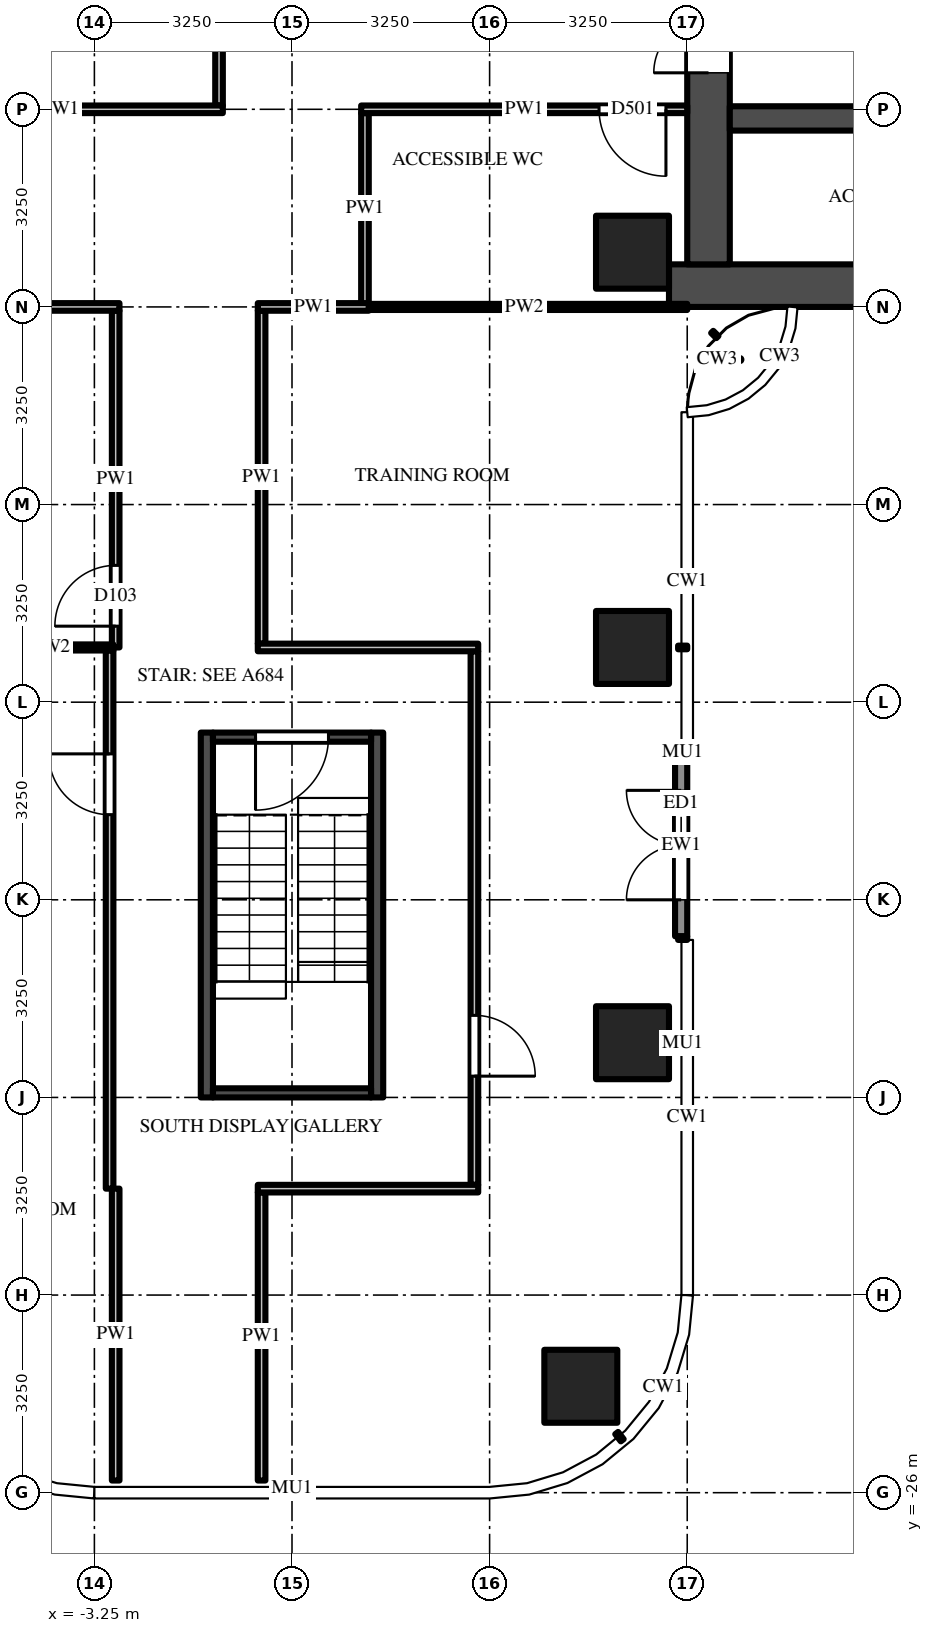
"""IFC4 building model, lengths in metres.
Left out: names, types, materials, properties, quantities, classifications, styles, units other than length and angle.
Written with IfcOpenShell. Run it as: python <this file> out.ifc"""

import sys

from ifc_helpers import new_model, si_unit, direction, frame, frame_2d, origin, origin_2d, place, context, subcontext, project, spatial, rectangle, extrude, source, transform, mapped, element, fill, save


model = new_model("IFC4")
c1 = context("Model", 3, precision=1e-05, world=origin(), true_north=direction((0.0, 1.0)))
c2 = subcontext(c1, "Body", "Model", "MODEL_VIEW")
j1 = project(units=[si_unit("LENGTHUNIT", "METRE"), si_unit("PLANEANGLEUNIT", "RADIAN")], contexts=[c1])
p1 = place(None, origin())
s1 = spatial("IfcSite", under=j1, at=p1, CompositionType="ELEMENT")
p2 = place(p1, origin())
s2 = spatial("IfcBuilding", under=s1, at=p2, CompositionType="ELEMENT")
p3 = place(p2, frame((0.0, 0.0, 165.9)))
s3 = spatial("IfcBuildingStorey", under=s2, at=p3, CompositionType="ELEMENT", Elevation=165.9)
m1 = source(origin(), c2, "Body", "SweptSolid", [
    extrude(rectangle(XDim=1.2, YDim=1.2, at=origin_2d()), origin(), (0.0, 0.0, 1.0), 3.9),
])
for number, where, z_axis, x_axis in (
    (1, (5.6, -5.6, 0.0), (0.0, 0.0, 1.0), (1.0, 0.0, 0.0)),
    (2, (5.6, -12.1, 0.0), (0.0, 0.0, 1.0), (1.0, 0.0, 0.0)),
    (3, (5.6, -18.6, 0.0), (0.0, 0.0, 1.0), (1.0, 0.0, 0.0)),
    (4, (4.75, -24.25, 0.0), (0.0, 0.0, 1.0), (1.0, 0.0, 0.0)),
):
    element("IfcColumn", number, at=place(p3, frame(where, z_axis=z_axis, x_axis=x_axis)), inside=s3, PredefinedType="COLUMN", context=c2, shape_type="MappedRepresentation", body=[
        mapped(m1, transform((0.0, 0.0, 0.0))),
    ])
m2 = source(origin(), c2, "Body", "SweptSolid", [
    extrude(rectangle(XDim=16.55, YDim=0.7, at=frame_2d((8.275, 0.0))), origin(), (0.0, 0.0, 1.0), 3.7),
])
p4 = place(p3, frame((6.2, -6.15, 0.0), z_axis=(0.0, 0.0, 1.0), x_axis=(1.0, 0.0, 0.0)))
e5 = element("IfcWall", 5, at=p4, inside=s3, PredefinedType="SHEAR", context=c2, shape_type="MappedRepresentation", body=[
    mapped(m2, transform((0.0, 0.0, 0.0))),
])
m3 = source(origin(), c2, "Body", "SweptSolid", [
    extrude(rectangle(XDim=9.05, YDim=0.7, at=frame_2d((4.525, 0.0))), origin(), (0.0, 0.0, 1.0), 3.7),
])
p5 = place(p3, frame((6.85, -5.8, 0.0), z_axis=(0.0, 0.0, 1.0), x_axis=(0.0, 1.0, 0.0)))
e6 = element("IfcWall", 6, at=p5, inside=s3, PredefinedType="SHEAR", context=c2, shape_type="MappedRepresentation", body=[
    mapped(m3, transform((0.0, 0.0, 0.0))),
])
m4 = source(origin(), c2, "Body", "SweptSolid", [
    extrude(rectangle(XDim=1.8, YDim=2.1, at=frame_2d((0.9, 1.05))), frame((0.0, 0.36, 0.0), z_axis=(0.0, -1.0, 0.0), x_axis=(1.0, 0.0, 0.0)), (0.0, 0.0, 1.0), 0.72),
])
p6 = place(p5, frame((3.15, 0.0, 0.0)))
e7 = element("IfcOpeningElement", 7, at=p6, cuts=e6, PredefinedType="OPENING", context=c2, shape_type="MappedRepresentation", body=[
    mapped(m4, transform((0.0, 0.0, 0.0))),
])
m5 = source(origin(), c2, "Body", "SweptSolid", [
    extrude(rectangle(XDim=7.5, YDim=0.4, at=frame_2d((3.75, 0.0))), origin(), (0.0, 0.0, 1.0), 3.7),
])
p7 = place(p3, frame((7.2, -3.4, 0.0), z_axis=(0.0, 0.0, 1.0), x_axis=(1.0, 0.0, 0.0)))
e8 = element("IfcWall", 8, at=p7, inside=s3, PredefinedType="SHEAR", context=c2, shape_type="MappedRepresentation", body=[
    mapped(m5, transform((0.0, 0.0, 0.0))),
])
m6 = source(origin(), c2, "Body", "SweptSolid", [
    extrude(rectangle(XDim=1.0, YDim=2.1, at=frame_2d((0.5, 1.05))), frame((0.0, 0.21, 0.0), z_axis=(0.0, -1.0, 0.0), x_axis=(1.0, 0.0, 0.0)), (0.0, 0.0, 1.0), 0.42),
])
p8 = place(p7, frame((2.363, 0.0, 0.0)))
e9 = element("IfcOpeningElement", 9, at=p8, cuts=e8, PredefinedType="OPENING", context=c2, shape_type="MappedRepresentation", body=[
    mapped(m6, transform((0.0, 0.0, 0.0))),
])
m7 = source(origin(), c2, "Body", "SweptSolid", [
    extrude(rectangle(XDim=0.8, YDim=2.1, at=frame_2d((0.4, 1.05))), frame((0.0, 0.21, 0.0), z_axis=(0.0, -1.0, 0.0), x_axis=(1.0, 0.0, 0.0)), (0.0, 0.0, 1.0), 0.42),
])
p9 = place(p7, frame((6.087, 0.0, 0.0)))
e10 = element("IfcOpeningElement", 10, at=p9, cuts=e8, PredefinedType="OPENING", context=c2, shape_type="MappedRepresentation", body=[
    mapped(m7, transform((0.0, 0.0, 0.0))),
])
m8 = source(origin(), c2, "Body", "SweptSolid", [
    extrude(rectangle(XDim=6.0, YDim=0.2, at=frame_2d((3.0, 0.0))), origin(), (0.0, 0.0, 1.0), 3.7),
])
for number, where, z_axis, x_axis in (
    (11, (1.4, -13.5, 0.0), (0.0, 0.0, 1.0), (0.0, -1.0, 0.0)),
    (12, (-1.4, -13.5, 0.0), (0.0, 0.0, 1.0), (0.0, -1.0, 0.0)),
):
    element("IfcWall", number, at=place(p3, frame(where, z_axis=z_axis, x_axis=x_axis)), inside=s3, PredefinedType="SHEAR", context=c2, shape_type="MappedRepresentation", body=[
        mapped(m8, transform((0.0, 0.0, 0.0))),
    ])
m9 = source(origin(), c2, "Body", "SweptSolid", [
    extrude(rectangle(XDim=2.6, YDim=0.15, at=frame_2d((1.3, 0.0))), origin(), (0.0, 0.0, 1.0), 3.7),
])
p10 = place(p3, frame((1.3, -13.575, 0.0), z_axis=(0.0, 0.0, 1.0), x_axis=(-1.0, 0.0, 0.0)))
e13 = element("IfcWall", 13, at=p10, inside=s3, PredefinedType="SHEAR", context=c2, shape_type="MappedRepresentation", body=[
    mapped(m9, transform((0.0, 0.0, 0.0))),
])
m10 = source(origin(), c2, "Body", "SweptSolid", [
    extrude(rectangle(XDim=1.2, YDim=2.1, at=frame_2d((0.6, 1.05))), frame((0.0, 0.085, 0.0), z_axis=(0.0, -1.0, 0.0), x_axis=(1.0, 0.0, 0.0)), (0.0, 0.0, 1.0), 0.17),
])
p11 = place(p10, frame((0.7, 0.0, 0.0)))
e14 = element("IfcOpeningElement", 14, at=p11, cuts=e13, PredefinedType="OPENING", context=c2, shape_type="MappedRepresentation", body=[
    mapped(m10, transform((0.0, 0.0, 0.0))),
])
p12 = place(p3, frame((1.3, -19.425, 0.0), z_axis=(0.0, 0.0, 1.0), x_axis=(-1.0, 0.0, 0.0)))
e15 = element("IfcWall", 15, at=p12, inside=s3, PredefinedType="SHEAR", context=c2, shape_type="MappedRepresentation", body=[
    mapped(m9, transform((0.0, 0.0, 0.0))),
])
m11 = source(origin(), c2, "Body", "SweptSolid", [
    extrude(rectangle(XDim=3.0, YDim=0.2, at=frame_2d((1.5, 0.0))), origin(), (0.0, 0.0, 1.0), 3.7),
])
p13 = place(p3, frame((6.4, -16.85, 0.0), z_axis=(0.0, 0.0, 1.0), x_axis=(0.0, 1.0, 0.0)))
e16 = element("IfcWall", 16, at=p13, inside=s3, PredefinedType="SOLIDWALL", context=c2, shape_type="MappedRepresentation", body=[
    mapped(m11, transform((0.0, 0.0, 0.0))),
])
m12 = source(origin(), c2, "Body", "SweptSolid", [
    extrude(rectangle(XDim=1.8, YDim=2.4, at=frame_2d((0.9, 1.2))), frame((0.0, 0.11, 0.0), z_axis=(0.0, -1.0, 0.0), x_axis=(1.0, 0.0, 0.0)), (0.0, 0.0, 1.0), 0.22),
])
p14 = place(p13, frame((0.6, 0.0, 0.0)))
e17 = element("IfcOpeningElement", 17, at=p14, cuts=e16, PredefinedType="OPENING", context=c2, shape_type="MappedRepresentation", body=[
    mapped(m12, transform((0.0, 0.0, 0.0))),
])
m13 = source(origin(), c2, "Body", "SweptSolid", [
    extrude(rectangle(XDim=8.85, YDim=0.125, at=frame_2d((4.425, 0.0))), origin(), (0.0, 0.0, 1.0), 2.997),
])
p15 = place(p3, frame((-3.0, -21.0, 0.0), z_axis=(0.0, 0.0, 1.0), x_axis=(0.0, 1.0, 0.0)))
e18 = element("IfcWall", 18, at=p15, inside=s3, PredefinedType="PARTITIONING", context=c2, shape_type="MappedRepresentation", body=[
    mapped(m13, transform((0.0, 0.0, 0.0))),
])
m14 = source(origin(), c2, "Body", "SweptSolid", [
    extrude(rectangle(XDim=1.0, YDim=2.1, at=frame_2d((0.5, 1.05))), frame((0.0, 0.073, 0.0), z_axis=(0.0, -1.0, 0.0), x_axis=(1.0, 0.0, 0.0)), (0.0, 0.0, 1.0), 0.145),
])
p16 = place(p15, frame((6.15, 0.0, 0.0)))
e19 = element("IfcOpeningElement", 19, at=p16, cuts=e18, PredefinedType="OPENING", context=c2, shape_type="MappedRepresentation", body=[
    mapped(m14, transform((0.0, 0.0, 0.0))),
])
m15 = source(origin(), c2, "Body", "SweptSolid", [
    extrude(rectangle(XDim=4.8, YDim=0.125, at=frame_2d((2.4, 0.0))), origin(), (0.0, 0.0, 1.0), 2.78),
])
p17 = place(p3, frame((-2.9, -25.8, 0.0), z_axis=(0.0, 0.0, 1.0), x_axis=(0.0, 1.0, 0.0)))
e20 = element("IfcWall", 20, at=p17, inside=s3, PredefinedType="PARTITIONING", context=c2, shape_type="MappedRepresentation", body=[
    mapped(m15, transform((0.0, 0.0, 0.0))),
])
m16 = source(origin(), c2, "Body", "SweptSolid", [
    extrude(rectangle(XDim=5.538, YDim=0.125, at=frame_2d((2.769, 0.0))), origin(), (0.0, 0.0, 1.0), 2.997),
])
p18 = place(p3, frame((-2.9, -12.1, 0.0), z_axis=(0.0, 0.0, 1.0), x_axis=(0.0, 1.0, 0.0)))
e21 = element("IfcWall", 21, at=p18, inside=s3, PredefinedType="PARTITIONING", context=c2, shape_type="MappedRepresentation", body=[
    mapped(m16, transform((0.0, 0.0, 0.0))),
])
p19 = place(p18, frame((0.35, 0.0, 0.0)))
e22 = element("IfcOpeningElement", 22, at=p19, cuts=e21, PredefinedType="OPENING", context=c2, shape_type="MappedRepresentation", body=[
    mapped(m14, transform((0.0, 0.0, 0.0))),
])
m17 = source(origin(), c2, "Body", "SweptSolid", [
    extrude(rectangle(XDim=3.125, YDim=0.125, at=frame_2d((1.562, 0.0))), origin(), (0.0, 0.0, 1.0), 3.068),
])
p20 = place(p3, frame((-1.2, -0.062, 0.0), z_axis=(0.0, 0.0, 1.0), x_axis=(0.0, -1.0, 0.0)))
e23 = element("IfcWall", 23, at=p20, inside=s3, PredefinedType="PARTITIONING", context=c2, shape_type="MappedRepresentation", body=[
    mapped(m17, transform((0.0, 0.0, 0.0))),
])
m18 = source(origin(), c2, "Body", "SweptSolid", [
    extrude(rectangle(XDim=4.738, YDim=0.125, at=frame_2d((2.369, 0.0))), origin(), (0.0, 0.0, 1.0), 2.78),
])
p21 = place(p3, frame((-0.5, -21.062, 0.0), z_axis=(0.0, 0.0, 1.0), x_axis=(0.0, -1.0, 0.0)))
e24 = element("IfcWall", 24, at=p21, inside=s3, PredefinedType="PARTITIONING", context=c2, shape_type="MappedRepresentation", body=[
    mapped(m18, transform((0.0, 0.0, 0.0))),
])
m19 = source(origin(), c2, "Body", "SweptSolid", [
    extrude(rectangle(XDim=5.475, YDim=0.125, at=frame_2d((2.738, 0.0))), origin(), (0.0, 0.0, 1.0), 2.997),
])
p22 = place(p3, frame((-0.5, -6.562, 0.0), z_axis=(0.0, 0.0, 1.0), x_axis=(0.0, -1.0, 0.0)))
e25 = element("IfcWall", 25, at=p22, inside=s3, PredefinedType="PARTITIONING", context=c2, shape_type="MappedRepresentation", body=[
    mapped(m19, transform((0.0, 0.0, 0.0))),
])
m20 = source(origin(), c2, "Body", "SweptSolid", [
    extrude(rectangle(XDim=3.137, YDim=0.125, at=frame_2d((1.569, 0.0))), origin(), (0.0, 0.0, 1.0), 2.997),
])
p23 = place(p3, frame((1.2, -3.312, 0.0), z_axis=(0.0, 0.0, 1.0), x_axis=(0.0, -1.0, 0.0)))
e26 = element("IfcWall", 26, at=p23, inside=s3, PredefinedType="PARTITIONING", context=c2, shape_type="MappedRepresentation", body=[
    mapped(m20, transform((0.0, 0.0, 0.0))),
])
m21 = source(origin(), c2, "Body", "SweptSolid", [
    extrude(rectangle(XDim=8.775, YDim=0.125, at=frame_2d((4.387, 0.0))), origin(), (0.0, 0.0, 1.0), 2.997),
])
p24 = place(p3, frame((3.0, -12.163, 0.0), z_axis=(0.0, 0.0, 1.0), x_axis=(0.0, -1.0, 0.0)))
e27 = element("IfcWall", 27, at=p24, inside=s3, PredefinedType="PARTITIONING", context=c2, shape_type="MappedRepresentation", body=[
    mapped(m21, transform((0.0, 0.0, 0.0))),
])
p25 = place(p24, frame((5.988, 0.0, 0.0)))
e28 = element("IfcOpeningElement", 28, at=p25, cuts=e27, PredefinedType="OPENING", context=c2, shape_type="MappedRepresentation", body=[
    mapped(m14, transform((0.0, 0.0, 0.0))),
])
m22 = source(origin(), c2, "Body", "SweptSolid", [
    extrude(rectangle(XDim=3.625, YDim=0.125, at=frame_2d((1.812, 0.0))), origin(), (0.0, 0.0, 1.0), 3.7),
])
p26 = place(p3, frame((3.062, -21.0, 0.0), z_axis=(0.0, 0.0, 1.0), x_axis=(-1.0, 0.0, 0.0)))
e29 = element("IfcWall", 29, at=p26, inside=s3, PredefinedType="PARTITIONING", context=c2, shape_type="MappedRepresentation", body=[
    mapped(m22, transform((0.0, 0.0, 0.0))),
])
m23 = source(origin(), c2, "Body", "SweptSolid", [
    extrude(rectangle(XDim=2.062, YDim=0.1, at=frame_2d((1.031, 0.0))), origin(), (0.0, 0.0, 1.0), 2.997),
])
p27 = place(p3, frame((-5.0, -12.1, 0.0), z_axis=(0.0, 0.0, 1.0), x_axis=(1.0, 0.0, 0.0)))
e30 = element("IfcWall", 30, at=p27, inside=s3, PredefinedType="PARTITIONING", context=c2, shape_type="MappedRepresentation", body=[
    mapped(m23, transform((0.0, 0.0, 0.0))),
])
m24 = source(origin(), c2, "Body", "SweptSolid", [
    extrude(rectangle(XDim=3.625, YDim=0.125, at=frame_2d((1.812, 0.0))), origin(), (0.0, 0.0, 1.0), 2.997),
])
p28 = place(p3, frame((-0.562, -12.1, 0.0), z_axis=(0.0, 0.0, 1.0), x_axis=(1.0, 0.0, 0.0)))
e31 = element("IfcWall", 31, at=p28, inside=s3, PredefinedType="PARTITIONING", context=c2, shape_type="MappedRepresentation", body=[
    mapped(m24, transform((0.0, 0.0, 0.0))),
])
m25 = source(origin(), c2, "Body", "SweptSolid", [
    extrude(rectangle(XDim=5.363, YDim=0.1, at=frame_2d((2.681, 0.0))), origin(), (0.0, 0.0, 1.0), 2.78),
])
p29 = place(p3, frame((1.137, -6.5, 0.0), z_axis=(0.0, 0.0, 1.0), x_axis=(1.0, 0.0, 0.0)))
e32 = element("IfcWall", 32, at=p29, inside=s3, PredefinedType="PARTITIONING", context=c2, shape_type="MappedRepresentation", body=[
    mapped(m25, transform((0.0, 0.0, 0.0))),
])
m26 = source(origin(), c2, "Body", "SweptSolid", [
    extrude(rectangle(XDim=3.725, YDim=0.125, at=frame_2d((1.863, 0.0))), origin(), (0.0, 0.0, 1.0), 2.78),
])
p30 = place(p3, frame((-2.837, -6.5, 0.0), z_axis=(0.0, 0.0, 1.0), x_axis=(-1.0, 0.0, 0.0)))
e33 = element("IfcWall", 33, at=p30, inside=s3, PredefinedType="PARTITIONING", context=c2, shape_type="MappedRepresentation", body=[
    mapped(m26, transform((0.0, 0.0, 0.0))),
])
m27 = source(origin(), c2, "Body", "SweptSolid", [
    extrude(rectangle(XDim=1.825, YDim=0.125, at=frame_2d((0.913, 0.0))), origin(), (0.0, 0.0, 1.0), 3.7),
])
p31 = place(p3, frame((1.262, -6.5, 0.0), z_axis=(0.0, 0.0, 1.0), x_axis=(-1.0, 0.0, 0.0)))
e34 = element("IfcWall", 34, at=p31, inside=s3, PredefinedType="PARTITIONING", context=c2, shape_type="MappedRepresentation", body=[
    mapped(m27, transform((0.0, 0.0, 0.0))),
])
m28 = source(origin(), c2, "Body", "SweptSolid", [
    extrude(rectangle(XDim=5.363, YDim=0.125, at=frame_2d((2.681, 0.0))), origin(), (0.0, 0.0, 1.0), 2.997),
])
p32 = place(p3, frame((-1.137, -3.25, 0.0), z_axis=(0.0, 0.0, 1.0), x_axis=(-1.0, 0.0, 0.0)))
e35 = element("IfcWall", 35, at=p32, inside=s3, PredefinedType="PARTITIONING", context=c2, shape_type="MappedRepresentation", body=[
    mapped(m28, transform((0.0, 0.0, 0.0))),
])
p33 = place(p32, frame((4.012, 0.0, 0.0)))
e36 = element("IfcOpeningElement", 36, at=p33, cuts=e35, PredefinedType="OPENING", context=c2, shape_type="MappedRepresentation", body=[
    mapped(m14, transform((0.0, 0.0, 0.0))),
])
p34 = place(p3, frame((6.5, -3.25, 0.0), z_axis=(0.0, 0.0, 1.0), x_axis=(-1.0, 0.0, 0.0)))
e37 = element("IfcWall", 37, at=p34, inside=s3, PredefinedType="PARTITIONING", context=c2, shape_type="MappedRepresentation", body=[
    mapped(m28, transform((0.0, 0.0, 0.0))),
])
m29 = source(origin(), c2, "Body", "SweptSolid", [
    extrude(rectangle(XDim=1.1, YDim=2.1, at=frame_2d((0.55, 1.05))), frame((0.0, 0.073, 0.0), z_axis=(0.0, -1.0, 0.0), x_axis=(1.0, 0.0, 0.0)), (0.0, 0.0, 1.0), 0.145),
])
p35 = place(p34, frame((0.35, 0.0, 0.0)))
e38 = element("IfcOpeningElement", 38, at=p35, cuts=e37, PredefinedType="OPENING", context=c2, shape_type="MappedRepresentation", body=[
    mapped(m29, transform((0.0, 0.0, 0.0))),
])
m30 = source(origin(), c2, "Body", "SweptSolid", [
    extrude(rectangle(XDim=1.8, YDim=2.1, at=frame_2d((0.9, 1.05))), frame((0.0, -0.275, 0.0), z_axis=(0.0, -1.0, 0.0), x_axis=(1.0, 0.0, 0.0)), (0.0, 0.0, 1.0), 0.05),
])
p36 = place(p6, origin())
e39 = element("IfcDoor", 39, at=p36, inside=s3, OperationType="DOUBLE_DOOR_SINGLE_SWING", PredefinedType="DOOR", context=c2, shape_type="MappedRepresentation", body=[
    mapped(m30, transform((0.0, 0.0, 0.0))),
])
fill(e7, e39)
m31 = source(origin(), c2, "Body", "SweptSolid", [
    extrude(rectangle(XDim=1.2, YDim=2.1, at=frame_2d((0.6, 1.05))), frame((0.0, 0.025, 0.0), z_axis=(0.0, -1.0, 0.0), x_axis=(1.0, 0.0, 0.0)), (0.0, 0.0, 1.0), 0.05),
])
p37 = place(p11, origin())
e40 = element("IfcDoor", 40, at=p37, inside=s3, OperationType="SINGLE_SWING_RIGHT", PredefinedType="DOOR", context=c2, shape_type="MappedRepresentation", body=[
    mapped(m31, transform((0.0, 0.0, 0.0))),
])
fill(e14, e40)
m32 = source(origin(), c2, "Body", "SweptSolid", [
    extrude(rectangle(XDim=1.8, YDim=2.4, at=frame_2d((0.9, 1.2))), frame((0.0, 0.025, 0.0), z_axis=(0.0, -1.0, 0.0), x_axis=(1.0, 0.0, 0.0)), (0.0, 0.0, 1.0), 0.05),
])
p38 = place(p14, origin())
e41 = element("IfcDoor", 41, at=p38, inside=s3, OperationType="DOUBLE_DOOR_SINGLE_SWING", PredefinedType="DOOR", context=c2, shape_type="MappedRepresentation", body=[
    mapped(m32, transform((0.0, 0.0, 0.0))),
])
fill(e17, e41)
m33 = source(origin(), c2, "Body", "SweptSolid", [
    extrude(rectangle(XDim=1.0, YDim=2.1, at=frame_2d((0.5, 1.05))), frame((0.0, 0.025, 0.0), z_axis=(0.0, -1.0, 0.0), x_axis=(1.0, 0.0, 0.0)), (0.0, 0.0, 1.0), 0.05),
])
p39 = place(p25, origin())
e42 = element("IfcDoor", 42, at=p39, inside=s3, OperationType="SINGLE_SWING_RIGHT", PredefinedType="DOOR", context=c2, shape_type="MappedRepresentation", body=[
    mapped(m33, transform((0.0, 0.0, 0.0))),
])
fill(e28, e42)
p40 = place(p16, origin())
e43 = element("IfcDoor", 43, at=p40, inside=s3, OperationType="SINGLE_SWING_RIGHT", PredefinedType="DOOR", context=c2, shape_type="MappedRepresentation", body=[
    mapped(m33, transform((0.0, 0.0, 0.0))),
])
fill(e19, e43)
p41 = place(p19, origin())
e44 = element("IfcDoor", 44, at=p41, inside=s3, OperationType="SINGLE_SWING_LEFT", PredefinedType="DOOR", context=c2, shape_type="MappedRepresentation", body=[
    mapped(m33, transform((0.0, 0.0, 0.0))),
])
fill(e22, e44)
m34 = source(origin(), c2, "Body", "SweptSolid", [
    extrude(rectangle(XDim=1.1, YDim=2.1, at=frame_2d((0.55, 1.05))), frame((0.0, 0.025, 0.0), z_axis=(0.0, -1.0, 0.0), x_axis=(1.0, 0.0, 0.0)), (0.0, 0.0, 1.0), 0.05),
])
p42 = place(p35, origin())
e45 = element("IfcDoor", 45, at=p42, inside=s3, OperationType="SINGLE_SWING_LEFT", PredefinedType="DOOR", context=c2, shape_type="MappedRepresentation", body=[
    mapped(m34, transform((0.0, 0.0, 0.0))),
])
fill(e38, e45)
save(model, sys.argv[1])
